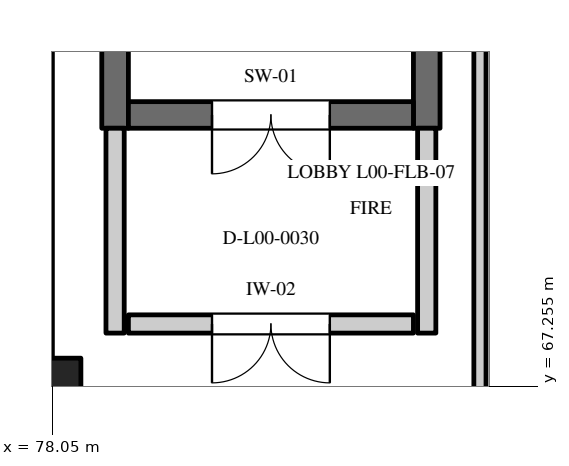
"""IFC4 building model, lengths in metres.
Left out: names, types, materials, properties, quantities, classifications, styles, units other than length and angle.
Written with IfcOpenShell. Run it as: python <this file> out.ifc"""

import sys

from ifc_helpers import new_model, si_unit, direction, frame, frame_2d, origin, origin_2d, place, context, subcontext, project, spatial, rectangle, extrude, element, fill, save


model = new_model("IFC4")
c1 = context("Model", 3, precision=1e-05, world=origin(), true_north=direction((0.0, 1.0)))
c2 = subcontext(c1, "Body", "Model", "MODEL_VIEW")
j1 = project(units=[si_unit("LENGTHUNIT", "METRE"), si_unit("PLANEANGLEUNIT", "RADIAN")], contexts=[c1])
p1 = place(None, origin())
s1 = spatial("IfcSite", under=j1, at=p1, CompositionType="ELEMENT")
p2 = place(p1, origin())
s2 = spatial("IfcBuilding", under=s1, at=p2, CompositionType="ELEMENT")
p3 = place(p2, origin())
s3 = spatial("IfcBuildingStorey", under=s2, at=p3, CompositionType="ELEMENT", Elevation=0.0)
p4 = place(p3, frame((78.0, 67.2, 0.0), z_axis=(0.0, 0.0, 1.0), x_axis=(1.0, 0.0, 0.0)))
e1 = element("IfcColumn", 1, at=p4, inside=s3, PredefinedType="COLUMN", context=c2, shape_type="SweptSolid", body=[
    extrude(rectangle(XDim=0.85, YDim=0.85, at=origin_2d()), origin(), (0.0, 0.0, 1.0), 4.8),
])
for number, where, z_axis, x_axis in (
    (2, (78.875, 70.65, 0.0), (0.0, 0.0, 1.0), (0.0, 1.0, 0.0)),
    (3, (82.975, 70.65, 0.0), (0.0, 0.0, 1.0), (0.0, 1.0, 0.0)),
):
    element("IfcWall", number, at=place(p3, frame(where, z_axis=z_axis, x_axis=x_axis)), inside=s3, PredefinedType="SHEAR", context=c2, shape_type="SweptSolid", body=[
        extrude(rectangle(XDim=10.5, YDim=0.35, at=frame_2d((5.25, 0.0))), origin(), (0.0, 0.0, 1.0), 4.8),
    ])
p5 = place(p3, frame((79.05, 70.825, 0.0), z_axis=(0.0, 0.0, 1.0), x_axis=(1.0, 0.0, 0.0)))
e4 = element("IfcWall", 4, at=p5, inside=s3, PredefinedType="SHEAR", context=c2, shape_type="SweptSolid", body=[
    extrude(rectangle(XDim=3.75, YDim=0.35, at=frame_2d((1.875, 0.0))), origin(), (0.0, 0.0, 1.0), 4.45),
])
p6 = place(p5, frame((1.1, 0.0, 0.0)))
e5 = element("IfcOpeningElement", 5, at=p6, cuts=e4, PredefinedType="OPENING", context=c2, shape_type="SweptSolid", body=[
    extrude(rectangle(XDim=1.55, YDim=2.25, at=frame_2d((0.775, 1.125))), frame((0.0, 0.187, 0.0), z_axis=(0.0, -1.0, 0.0), x_axis=(1.0, 0.0, 0.0)), (0.0, 0.0, 1.0), 0.374),
])
for number, where, z_axis, x_axis in (
    (6, (78.875, 67.955, 0.0), (0.0, 0.0, 1.0), (0.0, 1.0, 0.0)),
    (7, (82.975, 67.955, 0.0), (0.0, 0.0, 1.0), (0.0, 1.0, 0.0)),
):
    element("IfcWall", number, at=place(p3, frame(where, z_axis=z_axis, x_axis=x_axis)), inside=s3, PredefinedType="STANDARD", context=c2, shape_type="SweptSolid", body=[
        extrude(rectangle(XDim=2.695, YDim=0.24, at=frame_2d((1.347, 0.0))), origin(), (0.0, 0.0, 1.0), 4.45),
    ])
p7 = place(p3, frame((79.05, 68.075, 0.0), z_axis=(0.0, 0.0, 1.0), x_axis=(1.0, 0.0, 0.0)))
e8 = element("IfcWall", 8, at=p7, inside=s3, PredefinedType="STANDARD", context=c2, shape_type="SweptSolid", body=[
    extrude(rectangle(XDim=3.75, YDim=0.24, at=frame_2d((1.875, 0.0))), origin(), (0.0, 0.0, 1.0), 4.45),
])
p8 = place(p7, frame((1.1, 0.0, 0.0)))
e9 = element("IfcOpeningElement", 9, at=p8, cuts=e8, PredefinedType="OPENING", context=c2, shape_type="SweptSolid", body=[
    extrude(rectangle(XDim=1.55, YDim=2.25, at=frame_2d((0.775, 1.125))), frame((0.0, 0.132, 0.0), z_axis=(0.0, -1.0, 0.0), x_axis=(1.0, 0.0, 0.0)), (0.0, 0.0, 1.0), 0.264),
])
p9 = place(p3, frame((83.675, 54.085, 0.0), z_axis=(0.0, 0.0, 1.0), x_axis=(0.0, 1.0, 0.0)))
e10 = element("IfcWall", 10, at=p9, inside=s3, PredefinedType="PARTITIONING", context=c2, shape_type="SweptSolid", body=[
    extrude(rectangle(XDim=29.83, YDim=0.16, at=frame_2d((14.915, 0.0))), origin(), (0.0, 0.0, 1.0), 4.43),
])
p10 = place(p6, frame((1.55, 0.0, 0.0), z_axis=(0.0, 0.0, 1.0), x_axis=(-1.0, 0.0, 0.0)))
e11 = element("IfcDoor", 11, at=p10, inside=s3, OperationType="DOUBLE_DOOR_SINGLE_SWING", PredefinedType="DOOR", context=c2, shape_type="SweptSolid", body=[
    extrude(rectangle(XDim=1.55, YDim=2.25, at=frame_2d((0.775, 1.125))), frame((0.0, 0.025, 0.0), z_axis=(0.0, -1.0, 0.0), x_axis=(1.0, 0.0, 0.0)), (0.0, 0.0, 1.0), 0.05),
])
fill(e5, e11)
p11 = place(p8, frame((1.55, 0.0, 0.0), z_axis=(0.0, 0.0, 1.0), x_axis=(-1.0, 0.0, 0.0)))
e12 = element("IfcDoor", 12, at=p11, inside=s3, OperationType="DOUBLE_DOOR_SINGLE_SWING", PredefinedType="DOOR", context=c2, shape_type="SweptSolid", body=[
    extrude(rectangle(XDim=1.55, YDim=2.25, at=frame_2d((0.775, 1.125))), frame((0.0, 0.025, 0.0), z_axis=(0.0, -1.0, 0.0), x_axis=(1.0, 0.0, 0.0)), (0.0, 0.0, 1.0), 0.05),
])
fill(e9, e12)
save(model, sys.argv[1])
